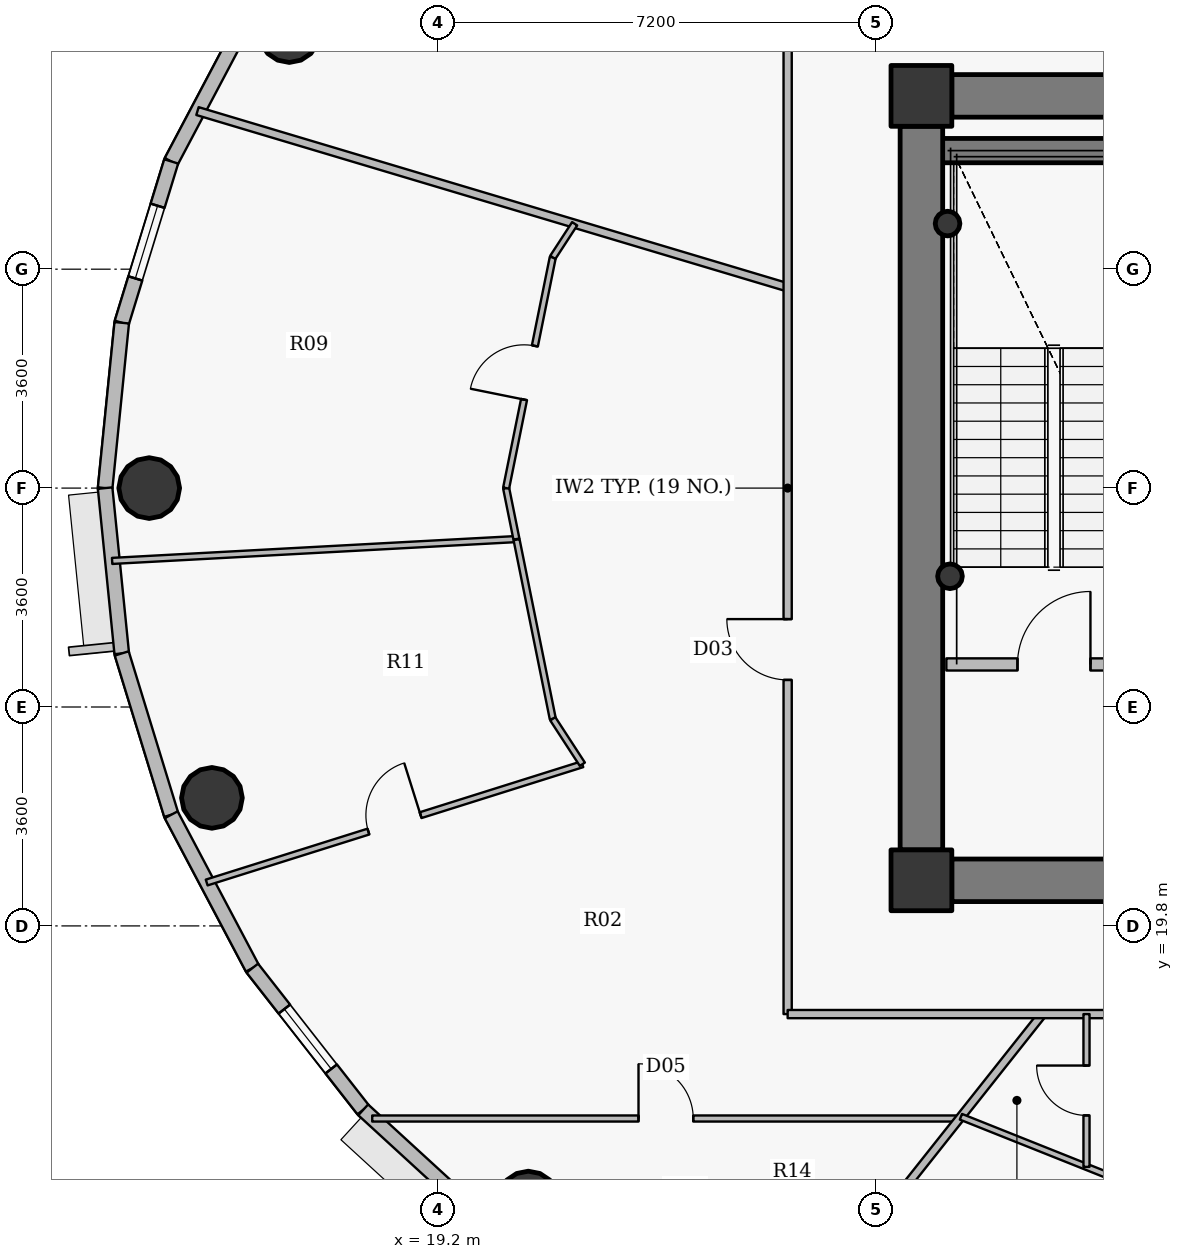
"""IFC4 building model, lengths in metres.
Left out: names, types, materials, properties, quantities, classifications, styles, units other than length and angle.
Written with IfcOpenShell. Run it as: python <this file> out.ifc"""

import sys

from ifc_helpers import new_model, si_unit, direction, frame, frame_2d, origin, origin_2d, place, context, subcontext, project, spatial, rectangle, hollow_circle, extrude, source, transform, mapped, element, fill, save


model = new_model("IFC4")
c1 = context("Model", 3, precision=1e-05, world=origin(), true_north=direction((0.0, 1.0)))
c2 = subcontext(c1, "Body", "Model", "MODEL_VIEW")
j1 = project(units=[si_unit("LENGTHUNIT", "METRE"), si_unit("PLANEANGLEUNIT", "RADIAN")], contexts=[c1])
p1 = place(None, origin())
s1 = spatial("IfcSite", under=j1, at=p1, CompositionType="ELEMENT")
p2 = place(p1, origin())
s2 = spatial("IfcBuilding", under=s1, at=p2, CompositionType="ELEMENT")
p3 = place(p2, frame((0.0, 0.0, 276.75)))
s3 = spatial("IfcBuildingStorey", under=s2, at=p3, CompositionType="ELEMENT", Elevation=276.75)
for number, where, z_axis, x_axis in (
    (1, (27.15, 20.55, 0.0), (0.0, 0.0, 1.0), (1.0, 0.0, 0.0)),
    (2, (27.15, 33.45, 0.0), (0.0, 0.0, 1.0), (1.0, 0.0, 0.0)),
):
    element("IfcColumn", number, at=place(p3, frame(where, z_axis=z_axis, x_axis=x_axis)), inside=s3, PredefinedType="COLUMN", context=c2, shape_type="SweptSolid", body=[
        extrude(rectangle(XDim=1.0, YDim=1.0, at=origin_2d()), origin(), (0.0, 0.0, 1.0), 3.75),
    ])
p4 = place(p3, frame((27.25, 32.55, 0.0), z_axis=(0.0, 0.0, 1.0), x_axis=(1.0, 0.0, 0.0)))
e3 = element("IfcWall", 3, at=p4, inside=s3, PredefinedType="SHEAR", context=c2, shape_type="SweptSolid", body=[
    extrude(rectangle(XDim=4.13, YDim=0.4, at=frame_2d((2.065, 0.0))), origin(), (0.0, 0.0, 1.0), 3.75),
])
for number, where, z_axis, x_axis in (
    (4, (27.58, 31.35, 0.0), (0.0, 0.0, 1.0), (1.0, 0.0, 0.0)),
    (5, (27.62, 25.55, 0.0), (0.0, 0.0, 1.0), (1.0, 0.0, 0.0)),
):
    element("IfcColumn", number, at=place(p3, frame(where, z_axis=z_axis, x_axis=x_axis)), inside=s3, PredefinedType="COLUMN", context=c2, shape_type="SweptSolid", body=[
        extrude(hollow_circle(Radius=0.203, WallThickness=0.016, at=origin_2d()), origin(), (0.0, 0.0, 1.0), 3.75),
    ])
p5 = place(p3, frame((27.65, 33.45, 0.0), z_axis=(0.0, 0.0, 1.0), x_axis=(1.0, 0.0, 0.0)))
e6 = element("IfcWall", 6, at=p5, inside=s3, PredefinedType="SHEAR", context=c2, shape_type="SweptSolid", body=[
    extrude(rectangle(XDim=16.7, YDim=0.7, at=frame_2d((8.35, 0.0))), origin(), (0.0, 0.0, 1.0), 3.05),
])
p6 = place(p5, frame((12.775, 0.0, 0.0)))
e7 = element("IfcOpeningElement", 7, at=p6, cuts=e6, PredefinedType="OPENING", context=c2, shape_type="SweptSolid", body=[
    extrude(rectangle(XDim=1.15, YDim=2.15, at=origin_2d()), frame((0.575, 0.36, 1.075), z_axis=(0.0, -1.0, 0.0), x_axis=(1.0, 0.0, 0.0)), (0.0, 0.0, 1.0), 0.72),
])
p7 = place(p3, frame((44.35, 20.55, 0.0), z_axis=(0.0, 0.0, 1.0), x_axis=(-1.0, 0.0, 0.0)))
e8 = element("IfcWall", 8, at=p7, inside=s3, PredefinedType="SHEAR", context=c2, shape_type="SweptSolid", body=[
    extrude(rectangle(XDim=16.7, YDim=0.7, at=frame_2d((8.35, 0.0))), origin(), (0.0, 0.0, 1.0), 3.05),
])
p8 = place(p7, frame((12.925, 0.0, 0.0)))
e9 = element("IfcOpeningElement", 9, at=p8, cuts=e8, PredefinedType="OPENING", context=c2, shape_type="SweptSolid", body=[
    extrude(rectangle(XDim=1.15, YDim=2.15, at=origin_2d()), frame((0.575, 0.36, 1.075), z_axis=(0.0, -1.0, 0.0), x_axis=(1.0, 0.0, 0.0)), (0.0, 0.0, 1.0), 0.72),
])
p9 = place(p7, frame((9.1, 0.0, 0.0)))
e10 = element("IfcOpeningElement", 10, at=p9, cuts=e8, PredefinedType="OPENING", context=c2, shape_type="SweptSolid", body=[
    extrude(rectangle(XDim=1.15, YDim=2.15, at=origin_2d()), frame((0.575, 0.36, 1.075), z_axis=(0.0, -1.0, 0.0), x_axis=(1.0, 0.0, 0.0)), (0.0, 0.0, 1.0), 0.72),
])
p10 = place(p3, frame((27.15, 21.05, 0.0), z_axis=(0.0, 0.0, 1.0), x_axis=(0.0, 1.0, 0.0)))
e11 = element("IfcWall", 11, at=p10, inside=s3, PredefinedType="SHEAR", context=c2, shape_type="SweptSolid", body=[
    extrude(rectangle(XDim=11.9, YDim=0.7, at=frame_2d((5.95, 0.0))), origin(), (0.0, 0.0, 1.0), 3.05),
])
for number, where, z_axis, x_axis in (
    (12, (16.754, 34.5, 0.0), (0.0, 0.0, 1.0), (1.0, 0.0, 0.0)),
    (13, (14.45, 27.0, 0.0), (0.0, 0.0, 1.0), (1.0, 0.0, 0.0)),
    (14, (15.481, 21.906, 0.0), (0.0, 0.0, 1.0), (1.0, 0.0, 0.0)),
    (15, (20.685, 15.267, 0.0), (0.0, 0.0, 1.0), (1.0, 0.0, 0.0)),
):
    element("IfcColumn", number, at=place(p3, frame(where, z_axis=z_axis, x_axis=x_axis)), inside=s3, PredefinedType="COLUMN", context=c2, shape_type="SweptSolid", body=[
        extrude(hollow_circle(Radius=0.5, WallThickness=0.032, at=origin_2d()), origin(), (0.0, 0.0, 1.0), 3.75),
    ])
p11 = place(p3, frame((14.812, 32.372, 0.0), z_axis=(0.0, 0.0, 1.0), x_axis=(0.467628269026, 0.883925224218, 0.0)))
e16 = element("IfcWall", 16, at=p11, inside=s3, PredefinedType="SOLIDWALL", context=c2, shape_type="SweptSolid", body=[
    extrude(rectangle(XDim=2.854, YDim=0.24, at=frame_2d((1.427, 0.0))), origin(), (0.0, 0.0, 1.0), 3.5),
])
p12 = place(p3, frame((13.998, 29.719, 0.0), z_axis=(0.0, 0.0, 1.0), x_axis=(0.2931213403, 0.956075248012, 0.0)))
e17 = element("IfcWall", 17, at=p12, inside=s3, PredefinedType="SOLIDWALL", context=c2, shape_type="SweptSolid", body=[
    extrude(rectangle(XDim=2.775, YDim=0.24, at=frame_2d((1.388, 0.0))), origin(), (0.0, 0.0, 1.0), 3.5),
])
p13 = place(p12, frame((0.763, 0.0, 0.9)))
e18 = element("IfcOpeningElement", 18, at=p13, cuts=e17, PredefinedType="OPENING", context=c2, shape_type="SweptSolid", body=[
    extrude(rectangle(XDim=1.25, YDim=1.65, at=origin_2d()), frame((0.625, 0.13, 0.825), z_axis=(0.0, -1.0, 0.0), x_axis=(1.0, 0.0, 0.0)), (0.0, 0.0, 1.0), 0.26),
])
for number, where, z_axis, x_axis in (
    (19, (13.725, 27.0, 0.0), (0.0, 0.0, 1.0), (0.1, 0.995, 0.0)),
    (20, (13.998, 24.281, 0.0), (0.0, 0.0, 1.0), (-0.1, 0.995, 0.0)),
):
    element("IfcWall", number, at=place(p3, frame(where, z_axis=z_axis, x_axis=x_axis)), inside=s3, PredefinedType="SOLIDWALL", context=c2, shape_type="SweptSolid", body=[
        extrude(rectangle(XDim=2.733, YDim=0.24, at=frame_2d((1.366, 0.0))), origin(), (0.0, 0.0, 1.0), 3.5),
    ])
p14 = place(p3, frame((14.812, 21.628, 0.0), z_axis=(0.0, 0.0, 1.0), x_axis=(-0.2931213403, 0.956075248012, 0.0)))
e21 = element("IfcWall", 21, at=p14, inside=s3, PredefinedType="SOLIDWALL", context=c2, shape_type="SweptSolid", body=[
    extrude(rectangle(XDim=2.775, YDim=0.24, at=frame_2d((1.388, 0.0))), origin(), (0.0, 0.0, 1.0), 3.5),
])
p15 = place(p3, frame((16.146, 19.105, 0.0), z_axis=(0.0, 0.0, 1.0), x_axis=(-0.467628269026, 0.883925224218, 0.0)))
e22 = element("IfcWall", 22, at=p15, inside=s3, PredefinedType="SOLIDWALL", context=c2, shape_type="SweptSolid", body=[
    extrude(rectangle(XDim=2.854, YDim=0.24, at=frame_2d((1.427, 0.0))), origin(), (0.0, 0.0, 1.0), 3.5),
])
p16 = place(p3, frame((17.97, 16.775, 0.0), z_axis=(0.0, 0.0, 1.0), x_axis=(-0.616337186556, 0.787482363275, 0.0)))
e23 = element("IfcWall", 23, at=p16, inside=s3, PredefinedType="SOLIDWALL", context=c2, shape_type="SweptSolid", body=[
    extrude(rectangle(XDim=2.958, YDim=0.24, at=frame_2d((1.479, 0.0))), origin(), (0.0, 0.0, 1.0), 3.5),
])
p17 = place(p16, frame((0.854, 0.0, 0.9)))
e24 = element("IfcOpeningElement", 24, at=p17, cuts=e23, PredefinedType="OPENING", context=c2, shape_type="SweptSolid", body=[
    extrude(rectangle(XDim=1.25, YDim=1.65, at=origin_2d()), frame((0.625, 0.13, 0.825), z_axis=(0.0, -1.0, 0.0), x_axis=(1.0, 0.0, 0.0)), (0.0, 0.0, 1.0), 0.26),
])
p18 = place(p3, frame((20.238, 14.696, 0.0), z_axis=(0.0, 0.0, 1.0), x_axis=(-0.737068506972, 0.675818034703, 0.0)))
e25 = element("IfcWall", 25, at=p18, inside=s3, PredefinedType="SOLIDWALL", context=c2, shape_type="SweptSolid", body=[
    extrude(rectangle(XDim=3.077, YDim=0.24, at=frame_2d((1.539, 0.0))), origin(), (0.0, 0.0, 1.0), 3.5),
])
p19 = place(p3, frame((13.84, 25.802, 0.0), z_axis=(0.0, 0.0, 1.0), x_axis=(0.998542593702, 0.05396932983, 0.0)))
e26 = element("IfcWall", 26, at=p19, inside=s3, PredefinedType="PARTITIONING", context=c2, shape_type="SweptSolid", body=[
    extrude(rectangle(XDim=6.659, YDim=0.1, at=frame_2d((3.33, 0.0))), origin(), (0.0, 0.0, 1.0), 2.985),
])
p20 = place(p3, frame((15.244, 33.2, 0.0), z_axis=(0.0, 0.0, 1.0), x_axis=(0.958167234785, -0.286208927508, 0.0)))
e27 = element("IfcWall", 27, at=p20, inside=s3, PredefinedType="PARTITIONING", context=c2, shape_type="SweptSolid", body=[
    extrude(rectangle(XDim=10.13, YDim=0.135, at=frame_2d((5.065, 0.0))), origin(), (0.0, 0.0, 1.0), 2.985),
])
p21 = place(p3, frame((15.396, 20.514, 0.0), z_axis=(0.0, 0.0, 1.0), x_axis=(0.95385684782, 0.300261742264, 0.0)))
e28 = element("IfcWall", 28, at=p21, inside=s3, PredefinedType="PARTITIONING", context=c2, shape_type="SweptSolid", body=[
    extrude(rectangle(XDim=6.477, YDim=0.1, at=frame_2d((3.239, 0.0))), origin(), (0.0, 0.0, 1.0), 2.985),
])
p22 = place(p21, frame((2.789, 0.0, 0.0)))
e29 = element("IfcOpeningElement", 29, at=p22, cuts=e28, PredefinedType="OPENING", context=c2, shape_type="SweptSolid", body=[
    extrude(rectangle(XDim=0.9, YDim=2.1, at=origin_2d()), frame((0.45, 0.06, 1.05), z_axis=(0.0, -1.0, 0.0), x_axis=(1.0, 0.0, 0.0)), (0.0, 0.0, 1.0), 0.12),
])
p23 = place(p3, frame((18.118, 16.633, 0.0), z_axis=(0.0, 0.0, 1.0), x_axis=(1.0, 0.0, 0.0)))
e30 = element("IfcWall", 30, at=p23, inside=s3, PredefinedType="PARTITIONING", context=c2, shape_type="SweptSolid", body=[
    extrude(rectangle(XDim=9.659, YDim=0.1, at=frame_2d((4.83, 0.0))), origin(), (0.0, 0.0, 1.0), 2.985),
])
p24 = place(p23, frame((4.379, 0.0, 0.0)))
e31 = element("IfcOpeningElement", 31, at=p24, cuts=e30, PredefinedType="OPENING", context=c2, shape_type="SweptSolid", body=[
    extrude(rectangle(XDim=0.9, YDim=2.1, at=origin_2d()), frame((0.45, 0.06, 1.05), z_axis=(0.0, -1.0, 0.0), x_axis=(1.0, 0.0, 0.0)), (0.0, 0.0, 1.0), 0.12),
])
p25 = place(p3, frame((20.32, 27.0, 0.0), z_axis=(0.0, 0.0, 1.0), x_axis=(0.198147261764, -0.980172261725, 0.0)))
e32 = element("IfcWall", 32, at=p25, inside=s3, PredefinedType="PARTITIONING", context=c2, shape_type="SweptSolid", body=[
    extrude(rectangle(XDim=0.855, YDim=0.1, at=frame_2d((0.427, 0.0))), origin(), (0.0, 0.0, 1.0), 3.035),
])
p26 = place(p3, frame((20.32, 27.0, 0.0), z_axis=(0.0, 0.0, 1.0), x_axis=(0.198226068862, 0.980156327135, 0.0)))
e33 = element("IfcWall", 33, at=p26, inside=s3, PredefinedType="PARTITIONING", context=c2, shape_type="SweptSolid", body=[
    extrude(rectangle(XDim=3.871, YDim=0.1, at=frame_2d((1.936, 0.0))), origin(), (0.0, 0.0, 1.0), 3.035),
])
p27 = place(p26, frame((1.486, 0.0, 0.0)))
e34 = element("IfcOpeningElement", 34, at=p27, cuts=e33, PredefinedType="OPENING", context=c2, shape_type="SweptSolid", body=[
    extrude(rectangle(XDim=0.9, YDim=2.1, at=origin_2d()), frame((0.45, 0.06, 1.05), z_axis=(0.0, -1.0, 0.0), x_axis=(1.0, 0.0, 0.0)), (0.0, 0.0, 1.0), 0.12),
])
p28 = place(p3, frame((20.491, 26.152, 0.0), z_axis=(0.0, 0.0, 1.0), x_axis=(0.198255475343, -0.980150379532, 0.0)))
e35 = element("IfcWall", 35, at=p28, inside=s3, PredefinedType="PARTITIONING", context=c2, shape_type="SweptSolid", body=[
    extrude(rectangle(XDim=3.006, YDim=0.1, at=frame_2d((1.503, 0.0))), origin(), (0.0, 0.0, 1.0), 3.035),
])
p29 = place(p3, frame((21.087, 23.206, 0.0), z_axis=(0.0, 0.0, 1.0), x_axis=(0.545565820765, -0.838067977681, 0.0)))
e36 = element("IfcWall", 36, at=p29, inside=s3, PredefinedType="PARTITIONING", context=c2, shape_type="SweptSolid", body=[
    extrude(rectangle(XDim=0.891, YDim=0.1, at=frame_2d((0.446, 0.0))), origin(), (0.0, 0.0, 1.0), 3.035),
])
p30 = place(p3, frame((21.087, 30.794, 0.0), z_axis=(0.0, 0.0, 1.0), x_axis=(0.545443507803, 0.838147588313, 0.0)))
e37 = element("IfcWall", 37, at=p30, inside=s3, PredefinedType="PARTITIONING", context=c2, shape_type="SweptSolid", body=[
    extrude(rectangle(XDim=0.66, YDim=0.1, at=frame_2d((0.33, 0.0))), origin(), (0.0, 0.0, 1.0), 3.5),
])
p31 = place(p3, frame((24.294, 12.242, 0.0), z_axis=(0.0, 0.0, 1.0), x_axis=(0.621439784824, 0.783461928774, 0.0)))
e38 = element("IfcWall", 38, at=p31, inside=s3, PredefinedType="PARTITIONING", context=c2, shape_type="SweptSolid", body=[
    extrude(rectangle(XDim=7.796, YDim=0.135, at=frame_2d((3.898, 0.0))), origin(), (0.0, 0.0, 1.0), 2.985),
])
p32 = place(p3, frame((24.95, 18.35, 0.0), z_axis=(0.0, 0.0, 1.0), x_axis=(0.0, 1.0, 0.0)))
e39 = element("IfcWall", 39, at=p32, inside=s3, PredefinedType="PARTITIONING", context=c2, shape_type="SweptSolid", body=[
    extrude(rectangle(XDim=17.3, YDim=0.135, at=frame_2d((8.65, 0.0))), origin(), (0.0, 0.0, 1.0), 3.035),
])
p33 = place(p32, frame((5.495, 0.0, 0.0)))
e40 = element("IfcOpeningElement", 40, at=p33, cuts=e39, PredefinedType="OPENING", context=c2, shape_type="SweptSolid", body=[
    extrude(rectangle(XDim=1.0, YDim=2.15, at=origin_2d()), frame((0.5, 0.078, 1.075), z_axis=(0.0, -1.0, 0.0), x_axis=(1.0, 0.0, 0.0)), (0.0, 0.0, 1.0), 0.155),
])
p34 = place(p3, frame((24.95, 18.35, 0.0), z_axis=(0.0, 0.0, 1.0), x_axis=(1.0, 0.0, 0.0)))
e41 = element("IfcWall", 41, at=p34, inside=s3, PredefinedType="PARTITIONING", context=c2, shape_type="SweptSolid", body=[
    extrude(rectangle(XDim=10.1, YDim=0.135, at=frame_2d((5.05, 0.0))), origin(), (0.0, 0.0, 1.0), 3.035),
])
p35 = place(p3, frame((27.56, 24.1, 0.0), z_axis=(0.0, 0.0, 1.0), x_axis=(1.0, 0.0, 0.0)))
e42 = element("IfcWall", 42, at=p35, inside=s3, PredefinedType="PARTITIONING", context=c2, shape_type="SweptSolid", body=[
    extrude(rectangle(XDim=3.54, YDim=0.2, at=frame_2d((1.77, 0.0))), origin(), (0.0, 0.0, 1.0), 3.5),
])
p36 = place(p35, frame((1.17, 0.0, 0.0)))
e43 = element("IfcOpeningElement", 43, at=p36, cuts=e42, PredefinedType="OPENING", context=c2, shape_type="SweptSolid", body=[
    extrude(rectangle(XDim=1.2, YDim=2.15, at=origin_2d()), frame((0.6, 0.11, 1.075), z_axis=(0.0, -1.0, 0.0), x_axis=(1.0, 0.0, 0.0)), (0.0, 0.0, 1.0), 0.22),
])
p37 = place(p3, frame((27.8, 16.662, 0.0), z_axis=(0.0, 0.0, 1.0), x_axis=(0.928783988526, -0.370621508628, 0.0)))
e44 = element("IfcWall", 44, at=p37, inside=s3, PredefinedType="PARTITIONING", context=c2, shape_type="SweptSolid", body=[
    extrude(rectangle(XDim=3.613, YDim=0.1, at=frame_2d((1.806, 0.0))), origin(), (0.0, 0.0, 1.0), 3.035),
])
p38 = place(p3, frame((29.865, 15.837, 0.0), z_axis=(0.0, 0.0, 1.0), x_axis=(0.0, 1.0, 0.0)))
e45 = element("IfcWall", 45, at=p38, inside=s3, PredefinedType="PARTITIONING", context=c2, shape_type="SweptSolid", body=[
    extrude(rectangle(XDim=2.513, YDim=0.1, at=frame_2d((1.256, 0.0))), origin(), (0.0, 0.0, 1.0), 3.035),
])
p39 = place(p38, frame((0.846, 0.0, 0.0)))
e46 = element("IfcOpeningElement", 46, at=p39, cuts=e45, PredefinedType="OPENING", context=c2, shape_type="SweptSolid", body=[
    extrude(rectangle(XDim=0.82, YDim=2.1, at=origin_2d()), frame((0.41, 0.06, 1.05), z_axis=(0.0, -1.0, 0.0), x_axis=(1.0, 0.0, 0.0)), (0.0, 0.0, 1.0), 0.12),
])
p40 = place(p3, frame((27.64, 33.8, 0.0), z_axis=(0.0, 0.0, 1.0), x_axis=(-1.0, 0.0, 0.0)))
e47 = element("IfcWall", 47, at=p40, inside=s3, PredefinedType="PARTITIONING", context=c2, shape_type="SweptSolid", body=[
    extrude(rectangle(XDim=0.84, YDim=0.135, at=frame_2d((0.42, 0.0))), origin(), (0.0, 0.0, 1.0), 3.035),
])
p41 = place(p3, frame((26.8, 33.492, 0.0), z_axis=(0.0, 0.0, 1.0), x_axis=(0.0, -1.0, 0.0)))
e48 = element("IfcWall", 48, at=p41, inside=s3, PredefinedType="PARTITIONING", context=c2, shape_type="SweptSolid", body=[
    extrude(rectangle(XDim=0.532, YDim=0.135, at=frame_2d((0.266, 0.0))), origin(), (0.0, 0.0, 1.0), 3.5),
])
p42 = place(p3, frame((26.8, 21.04, 0.0), z_axis=(0.0, 0.0, 1.0), x_axis=(0.0, -1.0, 0.0)))
e49 = element("IfcWall", 49, at=p42, inside=s3, PredefinedType="PARTITIONING", context=c2, shape_type="SweptSolid", body=[
    extrude(rectangle(XDim=0.84, YDim=0.135, at=frame_2d((0.42, 0.0))), origin(), (0.0, 0.0, 1.0), 3.035),
])
p43 = place(p3, frame((27.107, 20.2, 0.0), z_axis=(0.0, 0.0, 1.0), x_axis=(1.0, 0.0, 0.0)))
e50 = element("IfcWall", 50, at=p43, inside=s3, PredefinedType="PARTITIONING", context=c2, shape_type="SweptSolid", body=[
    extrude(rectangle(XDim=0.532, YDim=0.135, at=frame_2d((0.266, 0.0))), origin(), (0.0, 0.0, 1.0), 3.035),
])
m1 = source(origin(), c2, "Body", "SweptSolid", [
    extrude(rectangle(XDim=1.25, YDim=1.65, at=origin_2d()), frame((0.625, 0.03, 0.825), z_axis=(0.0, -1.0, 0.0), x_axis=(1.0, 0.0, 0.0)), (0.0, 0.0, 1.0), 0.06),
])
p44 = place(p13, origin())
e51 = element("IfcWindow", 51, at=p44, inside=s3, PartitioningType="SINGLE_PANEL", PredefinedType="WINDOW", context=c2, shape_type="MappedRepresentation", body=[
    mapped(m1, transform((0.0, 0.0, 0.0), x_axis=(1.0, 0.0, 0.0), y_axis=(0.0, 1.0, 0.0), z_axis=(0.0, 0.0, 1.0), scale=1.0)),
])
fill(e18, e51)
p45 = place(p17, origin())
e52 = element("IfcWindow", 52, at=p45, inside=s3, PartitioningType="SINGLE_PANEL", PredefinedType="WINDOW", context=c2, shape_type="MappedRepresentation", body=[
    mapped(m1, transform((0.0, 0.0, 0.0), x_axis=(1.0, 0.0, 0.0), y_axis=(0.0, 1.0, 0.0), z_axis=(0.0, 0.0, 1.0), scale=1.0)),
])
fill(e24, e52)
m2 = source(origin(), c2, "Body", "SweptSolid", [
    extrude(rectangle(XDim=1.2, YDim=2.15, at=origin_2d()), frame((0.6, 0.025, 1.075), z_axis=(0.0, -1.0, 0.0), x_axis=(1.0, 0.0, 0.0)), (0.0, 0.0, 1.0), 0.05),
])
p46 = place(p36, origin())
e53 = element("IfcDoor", 53, at=p46, inside=s3, OperationType="SINGLE_SWING_RIGHT", PredefinedType="DOOR", context=c2, shape_type="MappedRepresentation", body=[
    mapped(m2, transform((0.0, 0.0, 0.0), x_axis=(1.0, 0.0, 0.0), y_axis=(0.0, 1.0, 0.0), z_axis=(0.0, 0.0, 1.0), scale=1.0)),
])
fill(e43, e53)
m3 = source(origin(), c2, "Body", "SweptSolid", [
    extrude(rectangle(XDim=1.0, YDim=2.15, at=origin_2d()), frame((0.5, 0.025, 1.075), z_axis=(0.0, -1.0, 0.0), x_axis=(1.0, 0.0, 0.0)), (0.0, 0.0, 1.0), 0.05),
])
p47 = place(p33, origin())
e54 = element("IfcDoor", 54, at=p47, inside=s3, OperationType="SINGLE_SWING_RIGHT", PredefinedType="DOOR", context=c2, shape_type="MappedRepresentation", body=[
    mapped(m3, transform((0.0, 0.0, 0.0), x_axis=(1.0, 0.0, 0.0), y_axis=(0.0, 1.0, 0.0), z_axis=(0.0, 0.0, 1.0), scale=1.0)),
])
fill(e40, e54)
m4 = source(origin(), c2, "Body", "SweptSolid", [
    extrude(rectangle(XDim=0.9, YDim=2.1, at=origin_2d()), frame((0.45, 0.025, 1.05), z_axis=(0.0, -1.0, 0.0), x_axis=(1.0, 0.0, 0.0)), (0.0, 0.0, 1.0), 0.05),
])
p48 = place(p27, origin())
e55 = element("IfcDoor", 55, at=p48, inside=s3, OperationType="SINGLE_SWING_LEFT", PredefinedType="DOOR", context=c2, shape_type="MappedRepresentation", body=[
    mapped(m4, transform((0.0, 0.0, 0.0), x_axis=(1.0, 0.0, 0.0), y_axis=(0.0, 1.0, 0.0), z_axis=(0.0, 0.0, 1.0), scale=1.0)),
])
fill(e34, e55)
p49 = place(p22, origin())
e56 = element("IfcDoor", 56, at=p49, inside=s3, OperationType="SINGLE_SWING_RIGHT", PredefinedType="DOOR", context=c2, shape_type="MappedRepresentation", body=[
    mapped(m4, transform((0.0, 0.0, 0.0), x_axis=(1.0, 0.0, 0.0), y_axis=(0.0, 1.0, 0.0), z_axis=(0.0, 0.0, 1.0), scale=1.0)),
])
fill(e29, e56)
p50 = place(p24, origin())
e57 = element("IfcDoor", 57, at=p50, inside=s3, OperationType="SINGLE_SWING_LEFT", PredefinedType="DOOR", context=c2, shape_type="MappedRepresentation", body=[
    mapped(m4, transform((0.0, 0.0, 0.0), x_axis=(1.0, 0.0, 0.0), y_axis=(0.0, 1.0, 0.0), z_axis=(0.0, 0.0, 1.0), scale=1.0)),
])
fill(e31, e57)
m5 = source(origin(), c2, "Body", "SweptSolid", [
    extrude(rectangle(XDim=0.82, YDim=2.1, at=origin_2d()), frame((0.41, 0.025, 1.05), z_axis=(0.0, -1.0, 0.0), x_axis=(1.0, 0.0, 0.0)), (0.0, 0.0, 1.0), 0.05),
])
p51 = place(p39, origin())
e58 = element("IfcDoor", 58, at=p51, inside=s3, OperationType="SINGLE_SWING_RIGHT", PredefinedType="DOOR", context=c2, shape_type="MappedRepresentation", body=[
    mapped(m5, transform((0.0, 0.0, 0.0), x_axis=(1.0, 0.0, 0.0), y_axis=(0.0, 1.0, 0.0), z_axis=(0.0, 0.0, 1.0), scale=1.0)),
])
fill(e46, e58)
save(model, sys.argv[1])
